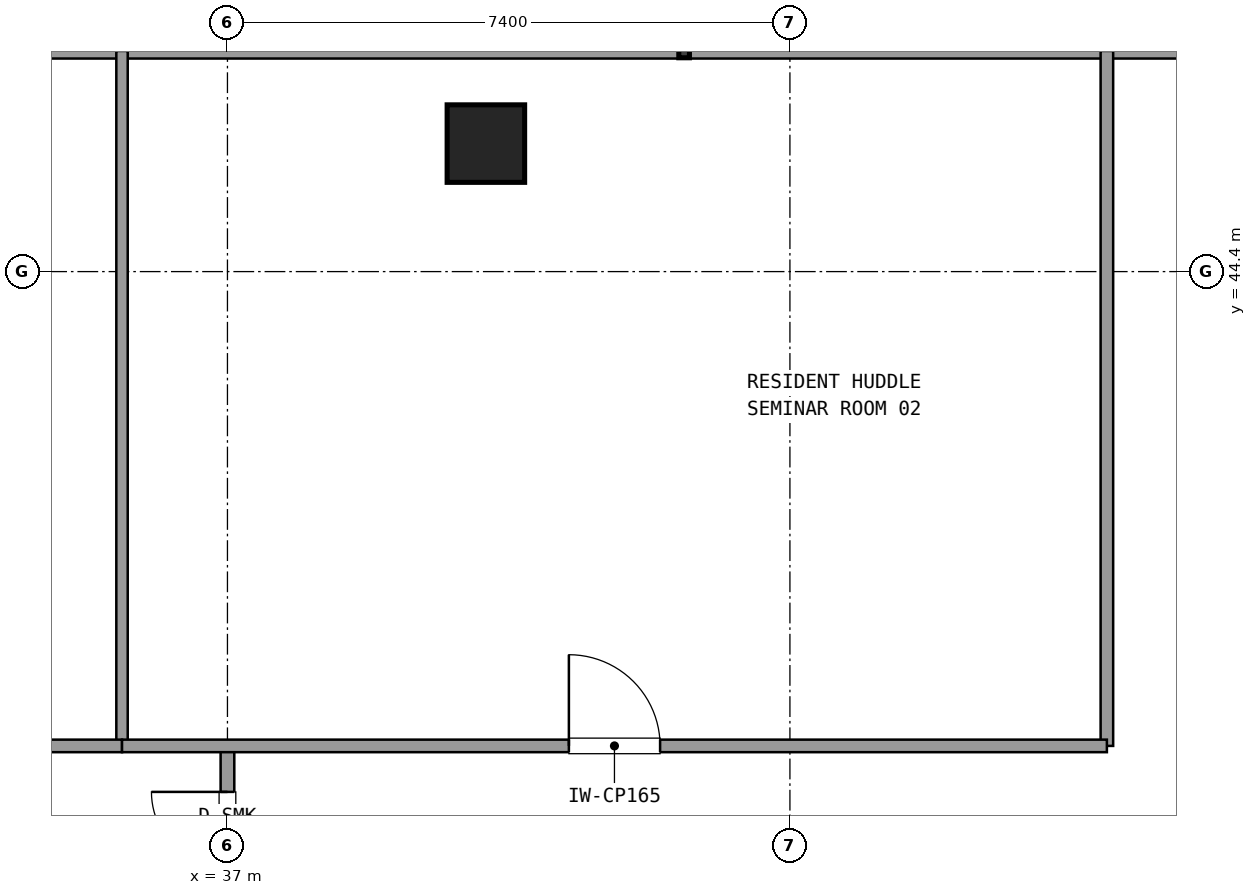
"""IFC4 building model, lengths in metres.
Left out: names, types, materials, properties, quantities, classifications, styles, units other than length and angle.
Written with IfcOpenShell. Run it as: python <this file> out.ifc"""

import sys

from ifc_helpers import new_model, si_unit, direction, frame, frame_2d, origin, origin_2d, place, context, subcontext, project, spatial, rectangle, extrude, element, fill, save


model = new_model("IFC4")
c1 = context("Model", 3, precision=1e-05, world=origin(), true_north=direction((0.0, 1.0)))
c2 = subcontext(c1, "Body", "Model", "MODEL_VIEW")
j1 = project(units=[si_unit("LENGTHUNIT", "METRE"), si_unit("PLANEANGLEUNIT", "RADIAN")], contexts=[c1])
p1 = place(None, origin())
s1 = spatial("IfcSite", under=j1, at=p1, CompositionType="ELEMENT")
p2 = place(p1, origin())
s2 = spatial("IfcBuilding", under=s1, at=p2, CompositionType="ELEMENT")
p3 = place(p2, frame((0.0, 0.0, 120.78)))
s3 = spatial("IfcBuildingStorey", under=s2, at=p3, CompositionType="ELEMENT", Elevation=120.78)
p4 = place(p3, frame((40.4, 46.084, 0.021), z_axis=(0.0, -0.024969910516, 0.999688203176), x_axis=(1.0, 0.0, 0.0)))
e1 = element("IfcColumn", 1, at=p4, inside=s3, PredefinedType="COLUMN", context=c2, shape_type="SweptSolid", body=[
    extrude(rectangle(XDim=1.02, YDim=1.02, at=origin_2d()), origin(), (0.0, 0.0, 1.0), 3.559),
])
p5 = place(p3, frame((55.024, 47.323, 0.0), z_axis=(0.0, 0.0, 1.0), x_axis=(-1.0, 0.0, 0.0)))
e2 = element("IfcWall", 2, at=p5, inside=s3, PredefinedType="SOLIDWALL", context=c2, shape_type="SweptSolid", body=[
    extrude(rectangle(XDim=36.048, YDim=0.24, at=frame_2d((18.024, 0.0))), origin(), (0.0, 0.0, 1.0), 0.85),
])
p6 = place(p3, frame((37.0, 34.95, 0.0), z_axis=(0.0, 0.0, 1.0), x_axis=(0.0, 1.0, 0.0)))
e3 = element("IfcWall", 3, at=p6, inside=s3, PredefinedType="PARTITIONING", context=c2, shape_type="SweptSolid", body=[
    extrude(rectangle(XDim=3.21, YDim=0.18, at=frame_2d((1.605, 0.0))), origin(), (0.0, 0.0, 1.0), 2.59),
])
p7 = place(p6, frame((0.605, 0.0, 0.0)))
e4 = element("IfcOpeningElement", 4, at=p7, cuts=e3, PredefinedType="OPENING", context=c2, shape_type="SweptSolid", body=[
    extrude(rectangle(XDim=2.0, YDim=2.2, at=frame_2d((1.0, 1.1))), frame((0.0, 0.1, 0.0), z_axis=(0.0, -1.0, 0.0), x_axis=(1.0, 0.0, 0.0)), (0.0, 0.0, 1.0), 0.2),
])
p8 = place(p3, frame((48.57, 38.16, 0.0), z_axis=(0.0, 0.0, 1.0), x_axis=(0.0, 1.0, 0.0)))
e5 = element("IfcWall", 5, at=p8, inside=s3, PredefinedType="PARTITIONING", context=c2, shape_type="SweptSolid", body=[
    extrude(rectangle(XDim=9.143, YDim=0.165, at=frame_2d((4.572, 0.0))), origin(), (0.0, 0.0, 1.0), 2.59),
])
p9 = place(p3, frame((35.613, 38.16, 0.0), z_axis=(0.0, 0.0, 1.0), x_axis=(0.0, 1.0, 0.0)))
e6 = element("IfcWall", 6, at=p9, inside=s3, PredefinedType="PARTITIONING", context=c2, shape_type="SweptSolid", body=[
    extrude(rectangle(XDim=9.143, YDim=0.15, at=frame_2d((4.572, 0.0))), origin(), (0.0, 0.0, 1.0), 2.59),
])
p10 = place(p3, frame((25.43, 38.16, 0.0), z_axis=(0.0, 0.0, 1.0), x_axis=(1.0, 0.0, 0.0)))
e7 = element("IfcWall", 7, at=p10, inside=s3, PredefinedType="PARTITIONING", context=c2, shape_type="SweptSolid", body=[
    extrude(rectangle(XDim=10.183, YDim=0.165, at=frame_2d((5.092, 0.0))), origin(), (0.0, 0.0, 1.0), 2.59),
])
p11 = place(p10, frame((4.492, 0.0, 0.0)))
e8 = element("IfcOpeningElement", 8, at=p11, cuts=e7, PredefinedType="OPENING", context=c2, shape_type="SweptSolid", body=[
    extrude(rectangle(XDim=1.2, YDim=2.15, at=frame_2d((0.6, 1.075))), frame((0.0, 0.093, 0.0), z_axis=(0.0, -1.0, 0.0), x_axis=(1.0, 0.0, 0.0)), (0.0, 0.0, 1.0), 0.185),
])
p12 = place(p3, frame((35.613, 38.16, 0.0), z_axis=(0.0, 0.0, 1.0), x_axis=(1.0, 0.0, 0.0)))
e9 = element("IfcWall", 9, at=p12, inside=s3, PredefinedType="PARTITIONING", context=c2, shape_type="SweptSolid", body=[
    extrude(rectangle(XDim=12.957, YDim=0.165, at=frame_2d((6.479, 0.0))), origin(), (0.0, 0.0, 1.0), 2.59),
])
p13 = place(p12, frame((5.879, 0.0, 0.0)))
e10 = element("IfcOpeningElement", 10, at=p13, cuts=e9, PredefinedType="OPENING", context=c2, shape_type="SweptSolid", body=[
    extrude(rectangle(XDim=1.2, YDim=2.15, at=frame_2d((0.6, 1.075))), frame((0.0, 0.093, 0.0), z_axis=(0.0, -1.0, 0.0), x_axis=(1.0, 0.0, 0.0)), (0.0, 0.0, 1.0), 0.185),
])
p14 = place(p7, origin())
e11 = element("IfcDoor", 11, at=p14, inside=s3, OperationType="DOUBLE_DOOR_SINGLE_SWING", PredefinedType="DOOR", context=c2, shape_type="SweptSolid", body=[
    extrude(rectangle(XDim=2.0, YDim=2.2, at=frame_2d((1.0, 1.1))), frame((0.0, 0.025, 0.0), z_axis=(0.0, -1.0, 0.0), x_axis=(1.0, 0.0, 0.0)), (0.0, 0.0, 1.0), 0.05),
])
fill(e4, e11)
p15 = place(p13, origin())
e12 = element("IfcDoor", 12, at=p15, inside=s3, OperationType="SINGLE_SWING_LEFT", PredefinedType="DOOR", context=c2, shape_type="SweptSolid", body=[
    extrude(rectangle(XDim=1.2, YDim=2.15, at=frame_2d((0.6, 1.075))), frame((0.0, 0.025, 0.0), z_axis=(0.0, -1.0, 0.0), x_axis=(1.0, 0.0, 0.0)), (0.0, 0.0, 1.0), 0.05),
])
fill(e10, e12)
save(model, sys.argv[1])
